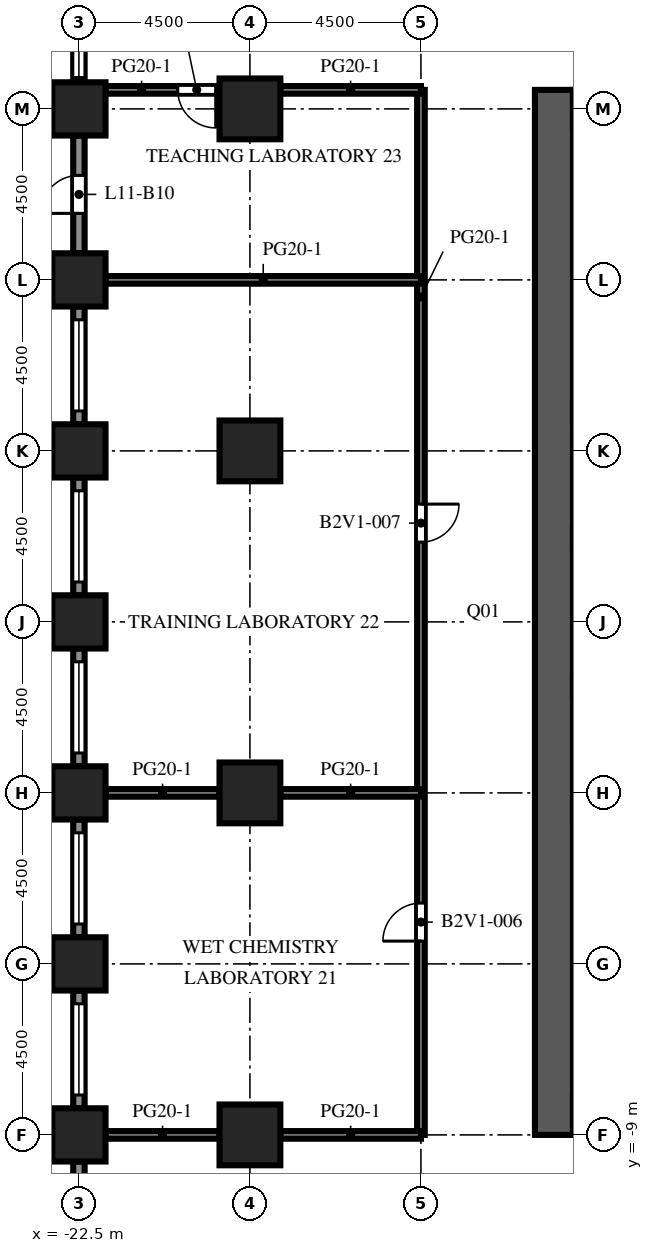
"""IFC4 building model, lengths in metres.
Left out: names, types, materials, properties, quantities, classifications, styles, units other than length and angle.
Written with IfcOpenShell. Run it as: python <this file> out.ifc"""

import sys

from ifc_helpers import new_model, si_unit, direction, frame, frame_2d, origin, origin_2d, place, context, subcontext, project, spatial, rectangle, extrude, element, fill, save


model = new_model("IFC4")
c1 = context("Model", 3, precision=1e-05, world=origin(), true_north=direction((0.0, 1.0)))
c2 = subcontext(c1, "Body", "Model", "MODEL_VIEW")
j1 = project(units=[si_unit("LENGTHUNIT", "METRE"), si_unit("PLANEANGLEUNIT", "RADIAN")], contexts=[c1])
p1 = place(None, origin())
s1 = spatial("IfcSite", under=j1, at=p1, CompositionType="ELEMENT")
p2 = place(p1, origin())
s2 = spatial("IfcBuilding", under=s1, at=p2, CompositionType="ELEMENT")
p3 = place(p2, frame((0.0, 0.0, 50.1)))
s3 = spatial("IfcBuildingStorey", under=s2, at=p3, CompositionType="ELEMENT", Elevation=50.1)
for number, where, z_axis, x_axis in (
    (1, (-22.5, -9.0, 0.0), (0.0, 0.0, 1.0), (1.0, 0.0, 0.0)),
    (2, (-22.5, -4.5, 0.0), (0.0, 0.0, 1.0), (1.0, 0.0, 0.0)),
    (3, (-22.5, 0.0, 0.0), (0.0, 0.0, 1.0), (1.0, 0.0, 0.0)),
    (4, (-22.5, 4.5, 0.0), (0.0, 0.0, 1.0), (1.0, 0.0, 0.0)),
    (5, (-22.5, 9.0, 0.0), (0.0, 0.0, 1.0), (1.0, 0.0, 0.0)),
    (6, (-22.5, 13.5, 0.0), (0.0, 0.0, 1.0), (1.0, 0.0, 0.0)),
    (7, (-22.5, 18.0, 0.0), (0.0, 0.0, 1.0), (1.0, 0.0, 0.0)),
):
    element("IfcColumn", number, at=place(p3, frame(where, z_axis=z_axis, x_axis=x_axis)), inside=s3, PredefinedType="COLUMN", context=c2, shape_type="SweptSolid", body=[
        extrude(rectangle(XDim=1.4, YDim=1.4, at=origin_2d()), origin(), (0.0, 0.0, 1.0), 4.1),
    ])
for number, where, z_axis, x_axis in (
    (8, (-18.0, -9.0, 0.0), (0.0, 0.0, 1.0), (1.0, 0.0, 0.0)),
    (9, (-18.0, 0.0, 0.0), (0.0, 0.0, 1.0), (1.0, 0.0, 0.0)),
    (10, (-18.0, 9.0, 0.0), (0.0, 0.0, 1.0), (1.0, 0.0, 0.0)),
    (11, (-18.0, 18.0, 0.0), (0.0, 0.0, 1.0), (1.0, 0.0, 0.0)),
):
    element("IfcColumn", number, at=place(p3, frame(where, z_axis=z_axis, x_axis=x_axis)), inside=s3, PredefinedType="COLUMN", context=c2, shape_type="SweptSolid", body=[
        extrude(rectangle(XDim=1.6, YDim=1.6, at=origin_2d()), origin(), (0.0, 0.0, 1.0), 4.1),
    ])
p4 = place(p3, frame((-10.0, -9.0, 0.0), z_axis=(0.0, 0.0, 1.0), x_axis=(0.0, 1.0, 0.0)))
e12 = element("IfcWall", 12, at=p4, inside=s3, PredefinedType="SHEAR", context=c2, shape_type="SweptSolid", body=[
    extrude(rectangle(XDim=27.5, YDim=1.0, at=frame_2d((13.75, 0.0))), origin(), (0.0, 0.0, 1.0), 4.1),
])
p5 = place(p4, frame((12.55, 0.0, 0.0)))
e13 = element("IfcOpeningElement", 13, at=p5, cuts=e12, PredefinedType="OPENING", context=c2, shape_type="SweptSolid", body=[
    extrude(rectangle(XDim=2.4, YDim=2.4, at=frame_2d((1.2, 1.2))), frame((0.0, 0.51, 0.0), z_axis=(0.0, -1.0, 0.0), x_axis=(1.0, 0.0, 0.0)), (0.0, 0.0, 1.0), 1.02),
])
p6 = place(p4, frame((6.825, 0.0, 0.0)))
e14 = element("IfcOpeningElement", 14, at=p6, cuts=e12, PredefinedType="OPENING", context=c2, shape_type="SweptSolid", body=[
    extrude(rectangle(XDim=1.2, YDim=2.1, at=frame_2d((0.6, 1.05))), frame((0.0, 0.51, 0.0), z_axis=(0.0, -1.0, 0.0), x_axis=(1.0, 0.0, 0.0)), (0.0, 0.0, 1.0), 1.02),
])
p7 = place(p4, frame((19.475, 0.0, 0.0)))
e15 = element("IfcOpeningElement", 15, at=p7, cuts=e12, PredefinedType="OPENING", context=c2, shape_type="SweptSolid", body=[
    extrude(rectangle(XDim=1.2, YDim=2.1, at=frame_2d((0.6, 1.05))), frame((0.0, 0.51, 0.0), z_axis=(0.0, -1.0, 0.0), x_axis=(1.0, 0.0, 0.0)), (0.0, 0.0, 1.0), 1.02),
])
p8 = place(p3, frame((-22.5, 18.7, 0.0), z_axis=(0.0, 0.0, 1.0), x_axis=(0.0, 1.0, 0.0)))
e16 = element("IfcWall", 16, at=p8, inside=s3, PredefinedType="SOLIDWALL", context=c2, shape_type="SweptSolid", body=[
    extrude(rectangle(XDim=3.1, YDim=0.3, at=frame_2d((1.55, 0.0))), origin(), (0.0, 0.0, 1.0), 2.75),
])
p9 = place(p8, frame((0.125, 0.0, 0.8)))
e17 = element("IfcOpeningElement", 17, at=p9, cuts=e16, PredefinedType="OPENING", context=c2, shape_type="SweptSolid", body=[
    extrude(rectangle(XDim=2.4, YDim=1.7, at=frame_2d((1.2, 0.85))), frame((0.0, 0.16, 0.0), z_axis=(0.0, -1.0, 0.0), x_axis=(1.0, 0.0, 0.0)), (0.0, 0.0, 1.0), 0.32),
])
p10 = place(p3, frame((-22.5, 14.2, 0.0), z_axis=(0.0, 0.0, 1.0), x_axis=(0.0, 1.0, 0.0)))
e18 = element("IfcWall", 18, at=p10, inside=s3, PredefinedType="SOLIDWALL", context=c2, shape_type="SweptSolid", body=[
    extrude(rectangle(XDim=3.1, YDim=0.3, at=frame_2d((1.55, 0.0))), origin(), (0.0, 0.0, 1.0), 2.75),
])
p11 = place(p10, frame((1.05, 0.0, 0.0)))
e19 = element("IfcOpeningElement", 19, at=p11, cuts=e18, PredefinedType="OPENING", context=c2, shape_type="SweptSolid", body=[
    extrude(rectangle(XDim=1.0, YDim=2.2, at=frame_2d((0.5, 1.1))), frame((0.0, 0.16, 0.0), z_axis=(0.0, -1.0, 0.0), x_axis=(1.0, 0.0, 0.0)), (0.0, 0.0, 1.0), 0.32),
])
p12 = place(p3, frame((-22.5, 9.7, 0.0), z_axis=(0.0, 0.0, 1.0), x_axis=(0.0, 1.0, 0.0)))
e20 = element("IfcWall", 20, at=p12, inside=s3, PredefinedType="SOLIDWALL", context=c2, shape_type="SweptSolid", body=[
    extrude(rectangle(XDim=3.1, YDim=0.3, at=frame_2d((1.55, 0.0))), origin(), (0.0, 0.0, 1.0), 2.75),
])
p13 = place(p12, frame((0.35, 0.0, 0.8)))
e21 = element("IfcOpeningElement", 21, at=p13, cuts=e20, PredefinedType="OPENING", context=c2, shape_type="SweptSolid", body=[
    extrude(rectangle(XDim=2.4, YDim=1.7, at=frame_2d((1.2, 0.85))), frame((0.0, 0.16, 0.0), z_axis=(0.0, -1.0, 0.0), x_axis=(1.0, 0.0, 0.0)), (0.0, 0.0, 1.0), 0.32),
])
p14 = place(p3, frame((-22.5, 5.2, 0.0), z_axis=(0.0, 0.0, 1.0), x_axis=(0.0, 1.0, 0.0)))
e22 = element("IfcWall", 22, at=p14, inside=s3, PredefinedType="SOLIDWALL", context=c2, shape_type="SweptSolid", body=[
    extrude(rectangle(XDim=3.1, YDim=0.3, at=frame_2d((1.55, 0.0))), origin(), (0.0, 0.0, 1.0), 2.75),
])
p15 = place(p14, frame((0.35, 0.0, 0.8)))
e23 = element("IfcOpeningElement", 23, at=p15, cuts=e22, PredefinedType="OPENING", context=c2, shape_type="SweptSolid", body=[
    extrude(rectangle(XDim=2.4, YDim=1.7, at=frame_2d((1.2, 0.85))), frame((0.0, 0.16, 0.0), z_axis=(0.0, -1.0, 0.0), x_axis=(1.0, 0.0, 0.0)), (0.0, 0.0, 1.0), 0.32),
])
p16 = place(p3, frame((-22.5, 0.7, 0.0), z_axis=(0.0, 0.0, 1.0), x_axis=(0.0, 1.0, 0.0)))
e24 = element("IfcWall", 24, at=p16, inside=s3, PredefinedType="SOLIDWALL", context=c2, shape_type="SweptSolid", body=[
    extrude(rectangle(XDim=3.1, YDim=0.3, at=frame_2d((1.55, 0.0))), origin(), (0.0, 0.0, 1.0), 2.75),
])
p17 = place(p16, frame((0.35, 0.0, 0.8)))
e25 = element("IfcOpeningElement", 25, at=p17, cuts=e24, PredefinedType="OPENING", context=c2, shape_type="SweptSolid", body=[
    extrude(rectangle(XDim=2.4, YDim=1.7, at=frame_2d((1.2, 0.85))), frame((0.0, 0.16, 0.0), z_axis=(0.0, -1.0, 0.0), x_axis=(1.0, 0.0, 0.0)), (0.0, 0.0, 1.0), 0.32),
])
p18 = place(p3, frame((-22.5, -3.8, 0.0), z_axis=(0.0, 0.0, 1.0), x_axis=(0.0, 1.0, 0.0)))
e26 = element("IfcWall", 26, at=p18, inside=s3, PredefinedType="SOLIDWALL", context=c2, shape_type="SweptSolid", body=[
    extrude(rectangle(XDim=3.1, YDim=0.3, at=frame_2d((1.55, 0.0))), origin(), (0.0, 0.0, 1.0), 2.75),
])
p19 = place(p18, frame((0.35, 0.0, 0.8)))
e27 = element("IfcOpeningElement", 27, at=p19, cuts=e26, PredefinedType="OPENING", context=c2, shape_type="SweptSolid", body=[
    extrude(rectangle(XDim=2.4, YDim=1.7, at=frame_2d((1.2, 0.85))), frame((0.0, 0.16, 0.0), z_axis=(0.0, -1.0, 0.0), x_axis=(1.0, 0.0, 0.0)), (0.0, 0.0, 1.0), 0.32),
])
p20 = place(p3, frame((-22.5, -8.3, 0.0), z_axis=(0.0, 0.0, 1.0), x_axis=(0.0, 1.0, 0.0)))
e28 = element("IfcWall", 28, at=p20, inside=s3, PredefinedType="SOLIDWALL", context=c2, shape_type="SweptSolid", body=[
    extrude(rectangle(XDim=3.1, YDim=0.3, at=frame_2d((1.55, 0.0))), origin(), (0.0, 0.0, 1.0), 2.75),
])
p21 = place(p20, frame((0.35, 0.0, 0.8)))
e29 = element("IfcOpeningElement", 29, at=p21, cuts=e28, PredefinedType="OPENING", context=c2, shape_type="SweptSolid", body=[
    extrude(rectangle(XDim=2.4, YDim=1.7, at=frame_2d((1.2, 0.85))), frame((0.0, 0.16, 0.0), z_axis=(0.0, -1.0, 0.0), x_axis=(1.0, 0.0, 0.0)), (0.0, 0.0, 1.0), 0.32),
])
p22 = place(p3, frame((-22.5, -12.8, 0.0), z_axis=(0.0, 0.0, 1.0), x_axis=(0.0, 1.0, 0.0)))
e30 = element("IfcWall", 30, at=p22, inside=s3, PredefinedType="SOLIDWALL", context=c2, shape_type="SweptSolid", body=[
    extrude(rectangle(XDim=3.1, YDim=0.3, at=frame_2d((1.55, 0.0))), origin(), (0.0, 0.0, 1.0), 2.75),
])
p23 = place(p22, frame((1.425, 0.0, 0.8)))
e31 = element("IfcOpeningElement", 31, at=p23, cuts=e30, PredefinedType="OPENING", context=c2, shape_type="SweptSolid", body=[
    extrude(rectangle(XDim=1.2, YDim=1.7, at=frame_2d((0.6, 0.85))), frame((0.0, 0.16, 0.0), z_axis=(0.0, -1.0, 0.0), x_axis=(1.0, 0.0, 0.0)), (0.0, 0.0, 1.0), 0.32),
])
p24 = place(p3, frame((-13.5, -9.0, 0.0), z_axis=(0.0, 0.0, 1.0), x_axis=(0.0, 1.0, 0.0)))
e32 = element("IfcWall", 32, at=p24, inside=s3, PredefinedType="PARTITIONING", context=c2, shape_type="SweptSolid", body=[
    extrude(rectangle(XDim=27.5, YDim=0.2, at=frame_2d((13.75, 0.0))), origin(), (0.0, 0.0, 1.0), 3.65),
])
p25 = place(p24, frame((5.1, 0.0, 0.0)))
e33 = element("IfcOpeningElement", 33, at=p25, cuts=e32, PredefinedType="OPENING", context=c2, shape_type="SweptSolid", body=[
    extrude(rectangle(XDim=1.0, YDim=2.1, at=frame_2d((0.5, 1.05))), frame((0.0, 0.11, 0.0), z_axis=(0.0, -1.0, 0.0), x_axis=(1.0, 0.0, 0.0)), (0.0, 0.0, 1.0), 0.22),
])
p26 = place(p24, frame((15.6, 0.0, 0.0)))
e34 = element("IfcOpeningElement", 34, at=p26, cuts=e32, PredefinedType="OPENING", context=c2, shape_type="SweptSolid", body=[
    extrude(rectangle(XDim=1.0, YDim=2.1, at=frame_2d((0.5, 1.05))), frame((0.0, 0.11, 0.0), z_axis=(0.0, -1.0, 0.0), x_axis=(1.0, 0.0, 0.0)), (0.0, 0.0, 1.0), 0.22),
])
p27 = place(p3, frame((-21.8, -9.0, 0.0), z_axis=(0.0, 0.0, 1.0), x_axis=(1.0, 0.0, 0.0)))
e35 = element("IfcWall", 35, at=p27, inside=s3, PredefinedType="PARTITIONING", context=c2, shape_type="SweptSolid", body=[
    extrude(rectangle(XDim=3.0, YDim=0.2, at=frame_2d((1.5, 0.0))), origin(), (0.0, 0.0, 1.0), 3.65),
])
p28 = place(p3, frame((-17.2, -9.0, 0.0), z_axis=(0.0, 0.0, 1.0), x_axis=(1.0, 0.0, 0.0)))
e36 = element("IfcWall", 36, at=p28, inside=s3, PredefinedType="PARTITIONING", context=c2, shape_type="SweptSolid", body=[
    extrude(rectangle(XDim=3.7, YDim=0.2, at=frame_2d((1.85, 0.0))), origin(), (0.0, 0.0, 1.0), 3.65),
])
p29 = place(p3, frame((-21.8, 0.0, 0.0), z_axis=(0.0, 0.0, 1.0), x_axis=(1.0, 0.0, 0.0)))
e37 = element("IfcWall", 37, at=p29, inside=s3, PredefinedType="PARTITIONING", context=c2, shape_type="SweptSolid", body=[
    extrude(rectangle(XDim=3.0, YDim=0.2, at=frame_2d((1.5, 0.0))), origin(), (0.0, 0.0, 1.0), 3.65),
])
p30 = place(p3, frame((-17.2, 0.0, 0.0), z_axis=(0.0, 0.0, 1.0), x_axis=(1.0, 0.0, 0.0)))
e38 = element("IfcWall", 38, at=p30, inside=s3, PredefinedType="PARTITIONING", context=c2, shape_type="SweptSolid", body=[
    extrude(rectangle(XDim=3.7, YDim=0.2, at=frame_2d((1.85, 0.0))), origin(), (0.0, 0.0, 1.0), 3.65),
])
p31 = place(p3, frame((-21.8, 13.5, 0.0), z_axis=(0.0, 0.0, 1.0), x_axis=(1.0, 0.0, 0.0)))
e39 = element("IfcWall", 39, at=p31, inside=s3, PredefinedType="PARTITIONING", context=c2, shape_type="SweptSolid", body=[
    extrude(rectangle(XDim=8.3, YDim=0.2, at=frame_2d((4.15, 0.0))), origin(), (0.0, 0.0, 1.0), 3.65),
])
p32 = place(p3, frame((-18.8, 18.5, 0.0), z_axis=(0.0, 0.0, 1.0), x_axis=(-1.0, 0.0, 0.0)))
e40 = element("IfcWall", 40, at=p32, inside=s3, PredefinedType="PARTITIONING", context=c2, shape_type="SweptSolid", body=[
    extrude(rectangle(XDim=3.0, YDim=0.2, at=frame_2d((1.5, 0.0))), origin(), (0.0, 0.0, 1.0), 3.65),
])
p33 = place(p32, frame((0.1, 0.0, 0.0)))
e41 = element("IfcOpeningElement", 41, at=p33, cuts=e40, PredefinedType="OPENING", context=c2, shape_type="SweptSolid", body=[
    extrude(rectangle(XDim=1.0, YDim=2.1, at=frame_2d((0.5, 1.05))), frame((0.0, 0.11, 0.0), z_axis=(0.0, -1.0, 0.0), x_axis=(1.0, 0.0, 0.0)), (0.0, 0.0, 1.0), 0.22),
])
p34 = place(p3, frame((-17.2, 18.5, 0.0), z_axis=(0.0, 0.0, 1.0), x_axis=(1.0, 0.0, 0.0)))
e42 = element("IfcWall", 42, at=p34, inside=s3, PredefinedType="PARTITIONING", context=c2, shape_type="SweptSolid", body=[
    extrude(rectangle(XDim=3.7, YDim=0.2, at=frame_2d((1.85, 0.0))), origin(), (0.0, 0.0, 1.0), 3.65),
])
p35 = place(p9, origin())
e43 = element("IfcWindow", 43, at=p35, inside=s3, PartitioningType="SINGLE_PANEL", PredefinedType="WINDOW", context=c2, shape_type="SweptSolid", body=[
    extrude(rectangle(XDim=2.4, YDim=1.7, at=frame_2d((1.2, 0.85))), frame((0.0, 0.03, 0.0), z_axis=(0.0, -1.0, 0.0), x_axis=(1.0, 0.0, 0.0)), (0.0, 0.0, 1.0), 0.06),
])
fill(e17, e43)
p36 = place(p11, origin())
e44 = element("IfcDoor", 44, at=p36, inside=s3, OperationType="SINGLE_SWING_LEFT", PredefinedType="DOOR", context=c2, shape_type="SweptSolid", body=[
    extrude(rectangle(XDim=1.0, YDim=2.2, at=frame_2d((0.5, 1.1))), frame((0.0, 0.025, 0.0), z_axis=(0.0, -1.0, 0.0), x_axis=(1.0, 0.0, 0.0)), (0.0, 0.0, 1.0), 0.05),
])
fill(e19, e44)
p37 = place(p13, origin())
e45 = element("IfcWindow", 45, at=p37, inside=s3, PartitioningType="SINGLE_PANEL", PredefinedType="WINDOW", context=c2, shape_type="SweptSolid", body=[
    extrude(rectangle(XDim=2.4, YDim=1.7, at=frame_2d((1.2, 0.85))), frame((0.0, 0.03, 0.0), z_axis=(0.0, -1.0, 0.0), x_axis=(1.0, 0.0, 0.0)), (0.0, 0.0, 1.0), 0.06),
])
fill(e21, e45)
p38 = place(p15, origin())
e46 = element("IfcWindow", 46, at=p38, inside=s3, PartitioningType="SINGLE_PANEL", PredefinedType="WINDOW", context=c2, shape_type="SweptSolid", body=[
    extrude(rectangle(XDim=2.4, YDim=1.7, at=frame_2d((1.2, 0.85))), frame((0.0, 0.03, 0.0), z_axis=(0.0, -1.0, 0.0), x_axis=(1.0, 0.0, 0.0)), (0.0, 0.0, 1.0), 0.06),
])
fill(e23, e46)
p39 = place(p17, origin())
e47 = element("IfcWindow", 47, at=p39, inside=s3, PartitioningType="SINGLE_PANEL", PredefinedType="WINDOW", context=c2, shape_type="SweptSolid", body=[
    extrude(rectangle(XDim=2.4, YDim=1.7, at=frame_2d((1.2, 0.85))), frame((0.0, 0.03, 0.0), z_axis=(0.0, -1.0, 0.0), x_axis=(1.0, 0.0, 0.0)), (0.0, 0.0, 1.0), 0.06),
])
fill(e25, e47)
p40 = place(p19, origin())
e48 = element("IfcWindow", 48, at=p40, inside=s3, PartitioningType="SINGLE_PANEL", PredefinedType="WINDOW", context=c2, shape_type="SweptSolid", body=[
    extrude(rectangle(XDim=2.4, YDim=1.7, at=frame_2d((1.2, 0.85))), frame((0.0, 0.03, 0.0), z_axis=(0.0, -1.0, 0.0), x_axis=(1.0, 0.0, 0.0)), (0.0, 0.0, 1.0), 0.06),
])
fill(e27, e48)
p41 = place(p21, origin())
e49 = element("IfcWindow", 49, at=p41, inside=s3, PartitioningType="SINGLE_PANEL", PredefinedType="WINDOW", context=c2, shape_type="SweptSolid", body=[
    extrude(rectangle(XDim=2.4, YDim=1.7, at=frame_2d((1.2, 0.85))), frame((0.0, 0.03, 0.0), z_axis=(0.0, -1.0, 0.0), x_axis=(1.0, 0.0, 0.0)), (0.0, 0.0, 1.0), 0.06),
])
fill(e29, e49)
p42 = place(p5, origin())
e50 = element("IfcDoor", 50, at=p42, inside=s3, OperationType="DOUBLE_DOOR_DOUBLE_SWING", PredefinedType="DOOR", context=c2, shape_type="SweptSolid", body=[
    extrude(rectangle(XDim=2.4, YDim=2.4, at=frame_2d((1.2, 1.2))), frame((0.0, 0.025, 0.0), z_axis=(0.0, -1.0, 0.0), x_axis=(1.0, 0.0, 0.0)), (0.0, 0.0, 1.0), 0.05),
])
fill(e13, e50)
p43 = place(p6, origin())
e51 = element("IfcDoor", 51, at=p43, inside=s3, OperationType="SINGLE_SWING_LEFT", PredefinedType="DOOR", context=c2, shape_type="SweptSolid", body=[
    extrude(rectangle(XDim=1.2, YDim=2.1, at=frame_2d((0.6, 1.05))), frame((0.0, 0.025, 0.0), z_axis=(0.0, -1.0, 0.0), x_axis=(1.0, 0.0, 0.0)), (0.0, 0.0, 1.0), 0.05),
])
fill(e14, e51)
p44 = place(p7, origin())
e52 = element("IfcDoor", 52, at=p44, inside=s3, OperationType="SINGLE_SWING_LEFT", PredefinedType="DOOR", context=c2, shape_type="SweptSolid", body=[
    extrude(rectangle(XDim=1.2, YDim=2.1, at=frame_2d((0.6, 1.05))), frame((0.0, 0.025, 0.0), z_axis=(0.0, -1.0, 0.0), x_axis=(1.0, 0.0, 0.0)), (0.0, 0.0, 1.0), 0.05),
])
fill(e15, e52)
p45 = place(p25, origin())
e53 = element("IfcDoor", 53, at=p45, inside=s3, OperationType="SINGLE_SWING_LEFT", PredefinedType="DOOR", context=c2, shape_type="SweptSolid", body=[
    extrude(rectangle(XDim=1.0, YDim=2.1, at=frame_2d((0.5, 1.05))), frame((0.0, 0.025, 0.0), z_axis=(0.0, -1.0, 0.0), x_axis=(1.0, 0.0, 0.0)), (0.0, 0.0, 1.0), 0.05),
])
fill(e33, e53)
p46 = place(p26, origin())
e54 = element("IfcDoor", 54, at=p46, inside=s3, OperationType="SINGLE_SWING_RIGHT", PredefinedType="DOOR", context=c2, shape_type="SweptSolid", body=[
    extrude(rectangle(XDim=1.0, YDim=2.1, at=frame_2d((0.5, 1.05))), frame((0.0, 0.025, 0.0), z_axis=(0.0, -1.0, 0.0), x_axis=(1.0, 0.0, 0.0)), (0.0, 0.0, 1.0), 0.05),
])
fill(e34, e54)
p47 = place(p33, origin())
e55 = element("IfcDoor", 55, at=p47, inside=s3, OperationType="SINGLE_SWING_LEFT", PredefinedType="DOOR", context=c2, shape_type="SweptSolid", body=[
    extrude(rectangle(XDim=1.0, YDim=2.1, at=frame_2d((0.5, 1.05))), frame((0.0, 0.025, 0.0), z_axis=(0.0, -1.0, 0.0), x_axis=(1.0, 0.0, 0.0)), (0.0, 0.0, 1.0), 0.05),
])
fill(e41, e55)
save(model, sys.argv[1])
